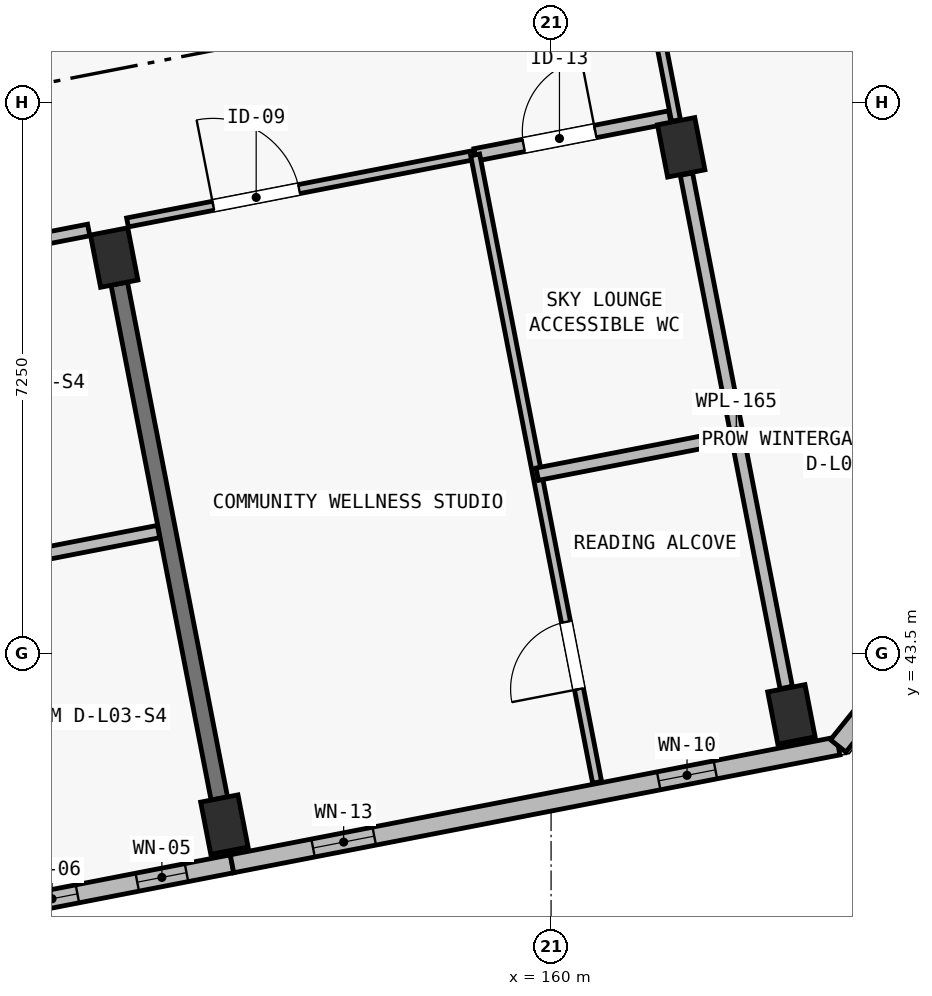
"""IFC4 building model, lengths in metres.
Left out: names, types, materials, properties, quantities, classifications, styles, units other than length and angle.
Written with IfcOpenShell. Run it as: python <this file> out.ifc"""

import sys

from ifc_helpers import new_model, si_unit, direction, frame, frame_2d, origin, origin_2d, place, context, subcontext, project, spatial, rectangle, extrude, element, fill, save


model = new_model("IFC4")
c1 = context("Model", 3, precision=1e-05, world=origin(), true_north=direction((0.0, 1.0)))
c2 = subcontext(c1, "Body", "Model", "MODEL_VIEW")
j1 = project(units=[si_unit("LENGTHUNIT", "METRE"), si_unit("PLANEANGLEUNIT", "RADIAN")], contexts=[c1])
p1 = place(None, origin())
s1 = spatial("IfcSite", under=j1, at=p1, CompositionType="ELEMENT")
p2 = place(p1, origin())
s2 = spatial("IfcBuilding", under=s1, at=p2, CompositionType="ELEMENT")
p3 = place(p2, frame((0.0, 0.0, 11.65)))
s3 = spatial("IfcBuildingStorey", under=s2, at=p3, CompositionType="ELEMENT", Elevation=11.65)
for number, where, z_axis, x_axis in (
    (1, (155.702, 41.251, 0.0), (0.0, 0.0, 1.0), (0.982, 0.191, 0.0)),
    (2, (154.252, 48.711, 0.0), (0.0, 0.0, 1.0), (0.982, 0.191, 0.0)),
    (3, (163.162, 42.701, 0.0), (0.0, 0.0, 1.0), (0.982, 0.191, 0.0)),
    (4, (161.712, 50.161, 0.0), (0.0, 0.0, 1.0), (0.982, 0.191, 0.0)),
):
    element("IfcColumn", number, at=place(p3, frame(where, z_axis=z_axis, x_axis=x_axis)), inside=s3, PredefinedType="COLUMN", context=c2, shape_type="SweptSolid", body=[
        extrude(rectangle(XDim=0.5, YDim=0.7, at=origin_2d()), origin(), (0.0, 0.0, 1.0), 3.25),
    ])
p4 = place(p3, frame((155.635, 41.594, 0.0), z_axis=(0.0, 0.0, 1.0), x_axis=(-0.190819465253, 0.981625148252, 0.0)))
e5 = element("IfcWall", 5, at=p4, inside=s3, PredefinedType="SHEAR", context=c2, shape_type="SweptSolid", body=[
    extrude(rectangle(XDim=6.9, YDim=0.22, at=frame_2d((3.45, 0.0))), origin(), (0.0, 0.0, 1.0), 2.5),
])
p5 = place(p3, frame((155.802, 40.735, 0.0), z_axis=(0.0, 0.0, 1.0), x_axis=(-0.981626422232, -0.190812911449, 0.0)))
e6 = element("IfcWall", 6, at=p5, inside=s3, PredefinedType="SOLIDWALL", context=c2, shape_type="SweptSolid", body=[
    extrude(rectangle(XDim=7.6, YDim=0.24, at=frame_2d((3.8, 0.0))), origin(), (0.0, 0.0, 1.0), 3.0),
])
p6 = place(p5, frame((0.61, 0.0, 0.48)))
e7 = element("IfcOpeningElement", 7, at=p6, cuts=e6, PredefinedType="OPENING", context=c2, shape_type="SweptSolid", body=[
    extrude(rectangle(XDim=0.66, YDim=2.32, at=frame_2d((0.33, 1.16))), frame((0.0, 0.135, 0.0), z_axis=(0.0, -1.0, 0.0), x_axis=(1.0, 0.0, 0.0)), (0.0, 0.0, 1.0), 0.27),
])
p7 = place(p5, frame((2.072, 0.0, 0.52)))
e8 = element("IfcOpeningElement", 8, at=p7, cuts=e6, PredefinedType="OPENING", context=c2, shape_type="SweptSolid", body=[
    extrude(rectangle(XDim=0.68, YDim=2.24, at=frame_2d((0.34, 1.12))), frame((0.0, 0.135, 0.0), z_axis=(0.0, -1.0, 0.0), x_axis=(1.0, 0.0, 0.0)), (0.0, 0.0, 1.0), 0.27),
])
p8 = place(p5, frame((5.837, 0.0, 0.48)))
e9 = element("IfcOpeningElement", 9, at=p8, cuts=e6, PredefinedType="OPENING", context=c2, shape_type="SweptSolid", body=[
    extrude(rectangle(XDim=0.72, YDim=2.16, at=frame_2d((0.36, 1.08))), frame((0.0, 0.135, 0.0), z_axis=(0.0, -1.0, 0.0), x_axis=(1.0, 0.0, 0.0)), (0.0, 0.0, 1.0), 0.27),
])
p9 = place(p3, frame((163.778, 42.286, 0.0), z_axis=(0.0, 0.0, 1.0), x_axis=(-0.981628367112, -0.190802905848, 0.0)))
e10 = element("IfcWall", 10, at=p9, inside=s3, PredefinedType="SOLIDWALL", context=c2, shape_type="SweptSolid", body=[
    extrude(rectangle(XDim=8.125, YDim=0.24, at=frame_2d((4.062, 0.0))), origin(), (0.0, 0.0, 1.0), 3.0),
])
p10 = place(p9, frame((1.646, 0.0, 0.52)))
e11 = element("IfcOpeningElement", 11, at=p10, cuts=e10, PredefinedType="OPENING", context=c2, shape_type="SweptSolid", body=[
    extrude(rectangle(XDim=0.76, YDim=2.34, at=frame_2d((0.38, 1.17))), frame((0.0, 0.135, 0.0), z_axis=(0.0, -1.0, 0.0), x_axis=(1.0, 0.0, 0.0)), (0.0, 0.0, 1.0), 0.27),
])
p11 = place(p9, frame((6.219, 0.0, 0.52)))
e12 = element("IfcOpeningElement", 12, at=p11, cuts=e10, PredefinedType="OPENING", context=c2, shape_type="SweptSolid", body=[
    extrude(rectangle(XDim=0.82, YDim=2.18, at=frame_2d((0.41, 1.09))), frame((0.0, 0.135, 0.0), z_axis=(0.0, -1.0, 0.0), x_axis=(1.0, 0.0, 0.0)), (0.0, 0.0, 1.0), 0.27),
])
p12 = place(p3, frame((159.837, 62.556, 0.0), z_axis=(0.0, 0.0, 1.0), x_axis=(0.389225507936, -0.921142499276, 0.0)))
e13 = element("IfcWall", 13, at=p12, inside=s3, PredefinedType="SOLIDWALL", context=c2, shape_type="SweptSolid", body=[
    extrude(rectangle(XDim=17.91, YDim=0.26, at=frame_2d((8.955, 0.0))), origin(), (0.0, 0.0, 1.0), 3.0),
])
p13 = place(p12, frame((2.99, 0.0, 0.52)))
e14 = element("IfcOpeningElement", 14, at=p13, cuts=e13, PredefinedType="OPENING", context=c2, shape_type="SweptSolid", body=[
    extrude(rectangle(XDim=0.72, YDim=2.16, at=frame_2d((0.36, 1.08))), frame((0.0, 0.145, 0.0), z_axis=(0.0, -1.0, 0.0), x_axis=(1.0, 0.0, 0.0)), (0.0, 0.0, 1.0), 0.29),
])
p14 = place(p12, frame((14.42, 0.0, 0.45)))
e15 = element("IfcOpeningElement", 15, at=p14, cuts=e13, PredefinedType="OPENING", context=c2, shape_type="SweptSolid", body=[
    extrude(rectangle(XDim=0.86, YDim=2.36, at=frame_2d((0.43, 1.18))), frame((0.0, 0.145, 0.0), z_axis=(0.0, -1.0, 0.0), x_axis=(1.0, 0.0, 0.0)), (0.0, 0.0, 1.0), 0.29),
])
p15 = place(p3, frame((166.809, 46.058, 0.0), z_axis=(0.0, 0.0, 1.0), x_axis=(-0.626281072923, -0.779597343312, 0.0)))
e16 = element("IfcWall", 16, at=p15, inside=s3, PredefinedType="SOLIDWALL", context=c2, shape_type="SweptSolid", body=[
    extrude(rectangle(XDim=4.839, YDim=0.26, at=frame_2d((2.42, 0.0))), origin(), (0.0, 0.0, 1.0), 3.0),
])
p16 = place(p3, frame((161.643, 50.515, 0.0), z_axis=(0.0, 0.0, 1.0), x_axis=(-0.190805731561, 0.981627817864, 0.0)))
e17 = element("IfcWall", 17, at=p16, inside=s3, PredefinedType="PARTITIONING", context=c2, shape_type="SweptSolid", body=[
    extrude(rectangle(XDim=3.68, YDim=0.12, at=frame_2d((1.84, 0.0))), origin(), (0.0, 0.0, 1.0), 2.5),
])
p17 = place(p16, frame((1.35, 0.0, 0.0)))
e18 = element("IfcOpeningElement", 18, at=p17, cuts=e17, PredefinedType="OPENING", context=c2, shape_type="SweptSolid", body=[
    extrude(rectangle(XDim=0.9, YDim=2.1, at=frame_2d((0.45, 1.05))), frame((0.0, 0.075, 0.0), z_axis=(0.0, -1.0, 0.0), x_axis=(1.0, 0.0, 0.0)), (0.0, 0.0, 1.0), 0.15),
])
p18 = place(p3, frame((163.094, 43.054, 0.0), z_axis=(0.0, 0.0, 1.0), x_axis=(-0.190804123115, 0.981628130507, 0.0)))
e19 = element("IfcWall", 19, at=p18, inside=s3, PredefinedType="PLUMBINGWALL", context=c2, shape_type="SweptSolid", body=[
    extrude(rectangle(XDim=6.88, YDim=0.165, at=frame_2d((3.44, 0.0))), origin(), (0.0, 0.0, 1.0), 2.5),
])
p19 = place(p3, frame((146.966, 47.723, 0.0), z_axis=(0.0, 0.0, 1.0), x_axis=(0.981629923556, 0.190794898199, 0.0)))
e20 = element("IfcWall", 20, at=p19, inside=s3, PredefinedType="PARTITIONING", context=c2, shape_type="SweptSolid", body=[
    extrude(rectangle(XDim=7.08, YDim=0.155, at=frame_2d((3.54, 0.0))), origin(), (0.0, 0.0, 1.0), 2.97),
])
p20 = place(p19, frame((1.33, 0.0, 0.0)))
e21 = element("IfcOpeningElement", 21, at=p20, cuts=e20, PredefinedType="OPENING", context=c2, shape_type="SweptSolid", body=[
    extrude(rectangle(XDim=1.02, YDim=2.2, at=frame_2d((0.51, 1.1))), frame((0.0, 0.093, 0.0), z_axis=(0.0, -1.0, 0.0), x_axis=(1.0, 0.0, 0.0)), (0.0, 0.0, 1.0), 0.185),
])
p21 = place(p3, frame((151.218, 44.403, 0.0), z_axis=(0.0, 0.0, 1.0), x_axis=(0.981626422232, 0.190812911449, 0.0)))
e22 = element("IfcWall", 22, at=p21, inside=s3, PredefinedType="PLUMBINGWALL", context=c2, shape_type="SweptSolid", body=[
    extrude(rectangle(XDim=3.685, YDim=0.165, at=frame_2d((1.842, 0.0))), origin(), (0.0, 0.0, 1.0), 2.97),
])
p22 = place(p21, frame((1.3, 0.0, 0.0)))
e23 = element("IfcOpeningElement", 23, at=p22, cuts=e22, PredefinedType="OPENING", context=c2, shape_type="SweptSolid", body=[
    extrude(rectangle(XDim=0.82, YDim=2.08, at=frame_2d((0.41, 1.04))), frame((0.0, 0.097, 0.0), z_axis=(0.0, -1.0, 0.0), x_axis=(1.0, 0.0, 0.0)), (0.0, 0.0, 1.0), 0.195),
])
p23 = place(p3, frame((154.427, 49.173, 0.0), z_axis=(0.0, 0.0, 1.0), x_axis=(0.981628202514, 0.190803752658, 0.0)))
e24 = element("IfcWall", 24, at=p23, inside=s3, PredefinedType="PARTITIONING", context=c2, shape_type="SweptSolid", body=[
    extrude(rectangle(XDim=4.66, YDim=0.12, at=frame_2d((2.33, 0.0))), origin(), (0.0, 0.0, 1.0), 2.97),
])
p24 = place(p23, frame((1.15, 0.0, 0.0)))
e25 = element("IfcOpeningElement", 25, at=p24, cuts=e24, PredefinedType="OPENING", context=c2, shape_type="SweptSolid", body=[
    extrude(rectangle(XDim=1.15, YDim=2.15, at=frame_2d((0.575, 1.075))), frame((0.0, 0.075, 0.0), z_axis=(0.0, -1.0, 0.0), x_axis=(1.0, 0.0, 0.0)), (0.0, 0.0, 1.0), 0.15),
])
p25 = place(p3, frame((159.001, 50.062, 0.0), z_axis=(0.0, 0.0, 1.0), x_axis=(0.981624151626, 0.190824592083, 0.0)))
e26 = element("IfcWall", 26, at=p25, inside=s3, PredefinedType="PLUMBINGWALL", context=c2, shape_type="SweptSolid", body=[
    extrude(rectangle(XDim=2.61, YDim=0.165, at=frame_2d((1.305, 0.0))), origin(), (0.0, 0.0, 1.0), 2.97),
])
p26 = place(p25, frame((0.65, 0.0, 0.0)))
e27 = element("IfcOpeningElement", 27, at=p26, cuts=e26, PredefinedType="OPENING", context=c2, shape_type="SweptSolid", body=[
    extrude(rectangle(XDim=0.96, YDim=2.12, at=frame_2d((0.48, 1.06))), frame((0.0, 0.097, 0.0), z_axis=(0.0, -1.0, 0.0), x_axis=(1.0, 0.0, 0.0)), (0.0, 0.0, 1.0), 0.195),
])
p27 = place(p3, frame((160.606, 41.807, 0.0), z_axis=(0.0, 0.0, 1.0), x_axis=(-0.190809830256, 0.981627021163, 0.0)))
e28 = element("IfcWall", 28, at=p27, inside=s3, PredefinedType="PARTITIONING", context=c2, shape_type="SweptSolid", body=[
    extrude(rectangle(XDim=8.41, YDim=0.12, at=frame_2d((4.205, 0.0))), origin(), (0.0, 0.0, 1.0), 2.97),
])
p28 = place(p27, frame((1.25, 0.0, 0.0)))
e29 = element("IfcOpeningElement", 29, at=p28, cuts=e28, PredefinedType="OPENING", context=c2, shape_type="SweptSolid", body=[
    extrude(rectangle(XDim=0.9, YDim=2.1, at=frame_2d((0.45, 1.05))), frame((0.0, 0.075, 0.0), z_axis=(0.0, -1.0, 0.0), x_axis=(1.0, 0.0, 0.0)), (0.0, 0.0, 1.0), 0.15),
])
p29 = place(p3, frame((159.818, 45.861, 0.0), z_axis=(0.0, 0.0, 1.0), x_axis=(0.981628634101, 0.19080153226, 0.0)))
e30 = element("IfcWall", 30, at=p29, inside=s3, PredefinedType="PLUMBINGWALL", context=c2, shape_type="SweptSolid", body=[
    extrude(rectangle(XDim=2.59, YDim=0.165, at=frame_2d((1.295, 0.0))), origin(), (0.0, 0.0, 1.0), 2.97),
])
p30 = place(p6, origin())
e31 = element("IfcWindow", 31, at=p30, inside=s3, PartitioningType="SINGLE_PANEL", PredefinedType="WINDOW", context=c2, shape_type="SweptSolid", body=[
    extrude(rectangle(XDim=0.66, YDim=2.32, at=frame_2d((0.33, 1.16))), frame((0.0, 0.03, 0.0), z_axis=(0.0, -1.0, 0.0), x_axis=(1.0, 0.0, 0.0)), (0.0, 0.0, 1.0), 0.06),
])
fill(e7, e31)
p31 = place(p7, origin())
e32 = element("IfcWindow", 32, at=p31, inside=s3, PartitioningType="SINGLE_PANEL", PredefinedType="WINDOW", context=c2, shape_type="SweptSolid", body=[
    extrude(rectangle(XDim=0.68, YDim=2.24, at=frame_2d((0.34, 1.12))), frame((0.0, 0.03, 0.0), z_axis=(0.0, -1.0, 0.0), x_axis=(1.0, 0.0, 0.0)), (0.0, 0.0, 1.0), 0.06),
])
fill(e8, e32)
p32 = place(p10, origin())
e33 = element("IfcWindow", 33, at=p32, inside=s3, PartitioningType="SINGLE_PANEL", PredefinedType="WINDOW", context=c2, shape_type="SweptSolid", body=[
    extrude(rectangle(XDim=0.76, YDim=2.34, at=frame_2d((0.38, 1.17))), frame((0.0, 0.03, 0.0), z_axis=(0.0, -1.0, 0.0), x_axis=(1.0, 0.0, 0.0)), (0.0, 0.0, 1.0), 0.06),
])
fill(e11, e33)
p33 = place(p11, origin())
e34 = element("IfcWindow", 34, at=p33, inside=s3, PartitioningType="SINGLE_PANEL", PredefinedType="WINDOW", context=c2, shape_type="SweptSolid", body=[
    extrude(rectangle(XDim=0.82, YDim=2.18, at=frame_2d((0.41, 1.09))), frame((0.0, 0.03, 0.0), z_axis=(0.0, -1.0, 0.0), x_axis=(1.0, 0.0, 0.0)), (0.0, 0.0, 1.0), 0.06),
])
fill(e12, e34)
p34 = place(p24, origin())
e35 = element("IfcDoor", 35, at=p34, inside=s3, OperationType="SINGLE_SWING_LEFT", PredefinedType="DOOR", context=c2, shape_type="SweptSolid", body=[
    extrude(rectangle(XDim=1.15, YDim=2.15, at=frame_2d((0.575, 1.075))), frame((0.0, 0.025, 0.0), z_axis=(0.0, -1.0, 0.0), x_axis=(1.0, 0.0, 0.0)), (0.0, 0.0, 1.0), 0.05),
])
fill(e25, e35)
p35 = place(p26, origin())
e36 = element("IfcDoor", 36, at=p35, inside=s3, OperationType="SINGLE_SWING_RIGHT", PredefinedType="DOOR", context=c2, shape_type="SweptSolid", body=[
    extrude(rectangle(XDim=0.96, YDim=2.12, at=frame_2d((0.48, 1.06))), frame((0.0, 0.025, 0.0), z_axis=(0.0, -1.0, 0.0), x_axis=(1.0, 0.0, 0.0)), (0.0, 0.0, 1.0), 0.05),
])
fill(e27, e36)
p36 = place(p28, origin())
e37 = element("IfcDoor", 37, at=p36, inside=s3, OperationType="SINGLE_SWING_LEFT", PredefinedType="DOOR", context=c2, shape_type="SweptSolid", body=[
    extrude(rectangle(XDim=0.9, YDim=2.1, at=frame_2d((0.45, 1.05))), frame((0.0, 0.025, 0.0), z_axis=(0.0, -1.0, 0.0), x_axis=(1.0, 0.0, 0.0)), (0.0, 0.0, 1.0), 0.05),
])
fill(e29, e37)
save(model, sys.argv[1])
